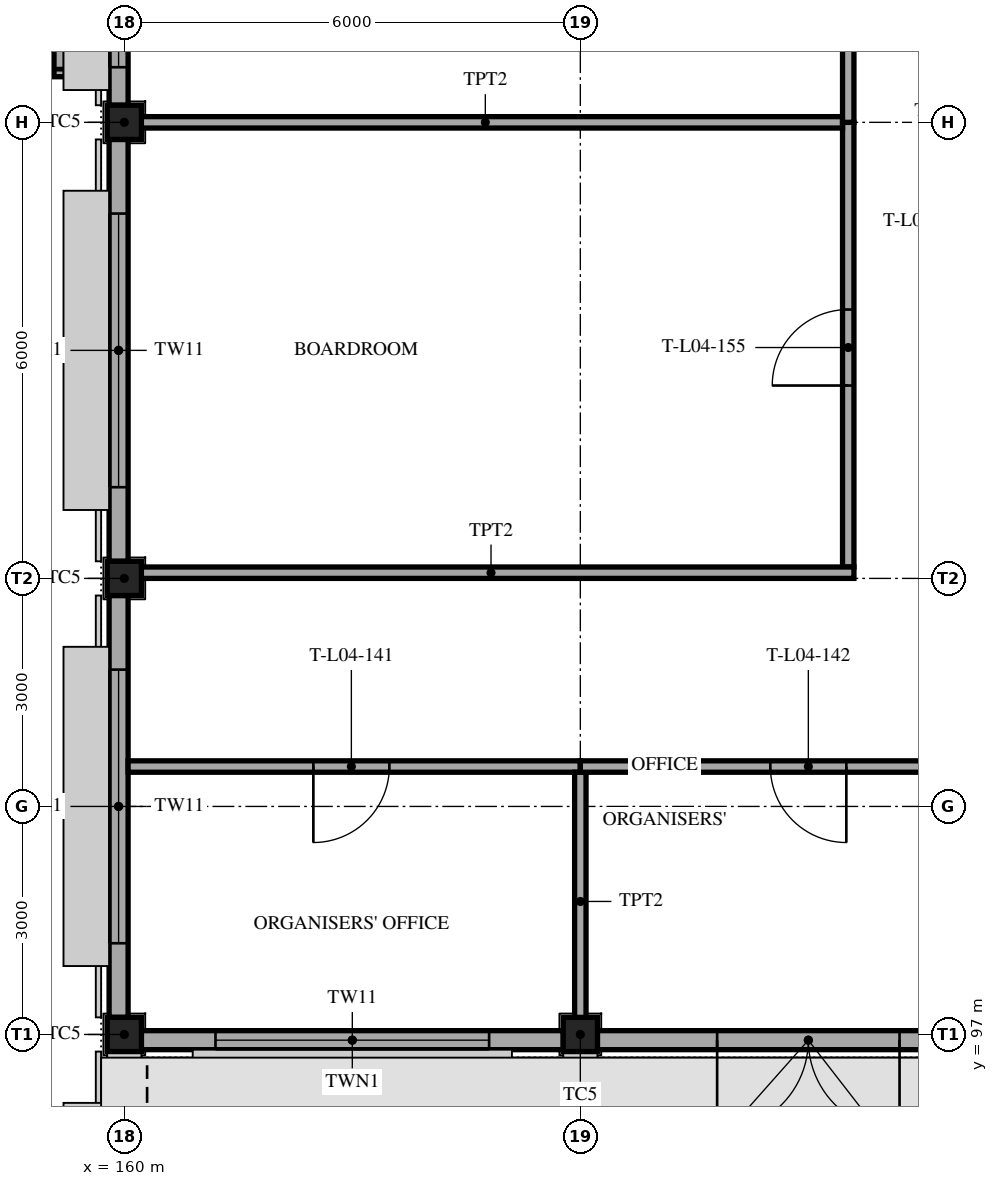
"""IFC4 building model, lengths in metres.
Left out: names, types, materials, properties, quantities, classifications, styles, units other than length and angle.
Written with IfcOpenShell. Run it as: python <this file> out.ifc"""

import sys

from ifc_helpers import new_model, si_unit, direction, frame, frame_2d, origin, origin_2d, place, context, subcontext, project, spatial, polyline, rectangle, hollow_rectangle, outline, extrude, element, fill, save


model = new_model("IFC4")
c1 = context("Model", 3, precision=1e-05, world=origin(), true_north=direction((0.0, 1.0)))
c2 = subcontext(c1, "Body", "Model", "MODEL_VIEW")
j1 = project(units=[si_unit("LENGTHUNIT", "METRE"), si_unit("PLANEANGLEUNIT", "RADIAN")], contexts=[c1])
p1 = place(None, origin())
s1 = spatial("IfcSite", under=j1, at=p1, CompositionType="ELEMENT")
p2 = place(p1, origin())
s2 = spatial("IfcBuilding", under=s1, at=p2, CompositionType="ELEMENT")
p3 = place(p2, frame((0.0, 0.0, 19.2)))
s3 = spatial("IfcBuildingStorey", under=s2, at=p3, CompositionType="ELEMENT", Elevation=19.2)
for number, where, z_axis, x_axis in (
    (1, (160.0, 97.0, 0.0), (0.0, 0.0, 1.0), (1.0, 0.0, 0.0)),
    (2, (160.0, 103.0, 0.0), (0.0, 0.0, 1.0), (1.0, 0.0, 0.0)),
    (3, (160.0, 109.0, 0.0), (0.0, 0.0, 1.0), (1.0, 0.0, 0.0)),
    (4, (166.0, 97.0, 0.0), (0.0, 0.0, 1.0), (1.0, 0.0, 0.0)),
):
    element("IfcColumn", number, at=place(p3, frame(where, z_axis=z_axis, x_axis=x_axis)), inside=s3, PredefinedType="COLUMN", context=c2, shape_type="SweptSolid", body=[
        extrude(hollow_rectangle(XDim=0.45, YDim=0.45, WallThickness=0.025, at=origin_2d()), origin(), (0.0, 0.0, 1.0), 4.2),
    ])
p4 = place(p3, frame((159.15, 109.6, 0.0), z_axis=(0.0, 0.0, 1.0), x_axis=(0.0, 1.0, 0.0)))
e5 = element("IfcWall", 5, at=p4, inside=s3, PredefinedType="STANDARD", context=c2, shape_type="SweptSolid", body=[
    extrude(outline(polyline([(0.0, 0.0), (23.0, 0.0), (22.97, 2.453), (22.83, 2.453), (22.829, 2.753), (19.171, 3.957), (19.17, 3.701), (19.03, 3.701), (19.029, 4.001), (15.371, 5.109), (15.37, 4.849), (15.23, 4.849), (15.229, 5.15), (11.571, 6.16), (11.57, 5.88), (11.43, 5.88), (11.429, 6.16), (7.771, 5.15), (7.77, 4.849), (7.63, 4.849), (7.629, 5.109), (3.971, 4.001), (3.97, 3.701), (3.83, 3.701), (3.829, 3.957), (0.171, 2.753), (0.17, 2.453), (0.03, 2.453), (0.0, 0.0)])), frame((0.0, 0.075, 0.0), z_axis=(0.0, -1.0, 0.0), x_axis=(1.0, 0.0, 0.0)), (0.0, 0.0, 1.0), 0.15),
])
p5 = place(p3, frame((160.225, 96.925, 0.0), z_axis=(0.0, 0.0, 1.0), x_axis=(1.0, 0.0, 0.0)))
e6 = element("IfcWall", 6, at=p5, inside=s3, PredefinedType="SOLIDWALL", context=c2, shape_type="SweptSolid", body=[
    extrude(rectangle(XDim=5.55, YDim=0.25, at=frame_2d((2.775, 0.0))), origin(), (0.0, 0.0, 1.0), 3.55),
])
p6 = place(p5, frame((0.975, 0.0, 0.9)))
e7 = element("IfcOpeningElement", 7, at=p6, cuts=e6, PredefinedType="OPENING", context=c2, shape_type="SweptSolid", body=[
    extrude(rectangle(XDim=3.6, YDim=2.4, at=frame_2d((1.8, 1.2))), frame((0.0, 0.135, 0.0), z_axis=(0.0, -1.0, 0.0), x_axis=(1.0, 0.0, 0.0)), (0.0, 0.0, 1.0), 0.27),
])
p7 = place(p3, frame((159.925, 91.225, 0.0), z_axis=(0.0, 0.0, 1.0), x_axis=(0.0, 1.0, 0.0)))
e8 = element("IfcWall", 8, at=p7, inside=s3, PredefinedType="SOLIDWALL", context=c2, shape_type="SweptSolid", body=[
    extrude(rectangle(XDim=5.55, YDim=0.25, at=frame_2d((2.775, 0.0))), origin(), (0.0, 0.0, 1.0), 3.55),
])
p8 = place(p7, frame((0.975, 0.0, 0.9)))
e9 = element("IfcOpeningElement", 9, at=p8, cuts=e8, PredefinedType="OPENING", context=c2, shape_type="SweptSolid", body=[
    extrude(rectangle(XDim=3.6, YDim=2.4, at=frame_2d((1.8, 1.2))), frame((0.0, 0.135, 0.0), z_axis=(0.0, -1.0, 0.0), x_axis=(1.0, 0.0, 0.0)), (0.0, 0.0, 1.0), 0.27),
])
p9 = place(p3, frame((159.925, 97.225, 0.0), z_axis=(0.0, 0.0, 1.0), x_axis=(0.0, 1.0, 0.0)))
e10 = element("IfcWall", 10, at=p9, inside=s3, PredefinedType="SOLIDWALL", context=c2, shape_type="SweptSolid", body=[
    extrude(rectangle(XDim=5.55, YDim=0.25, at=frame_2d((2.775, 0.0))), origin(), (0.0, 0.0, 1.0), 3.55),
])
p10 = place(p9, frame((0.975, 0.0, 0.9)))
e11 = element("IfcOpeningElement", 11, at=p10, cuts=e10, PredefinedType="OPENING", context=c2, shape_type="SweptSolid", body=[
    extrude(rectangle(XDim=3.6, YDim=2.4, at=frame_2d((1.8, 1.2))), frame((0.0, 0.135, 0.0), z_axis=(0.0, -1.0, 0.0), x_axis=(1.0, 0.0, 0.0)), (0.0, 0.0, 1.0), 0.27),
])
p11 = place(p3, frame((159.925, 103.225, 0.0), z_axis=(0.0, 0.0, 1.0), x_axis=(0.0, 1.0, 0.0)))
e12 = element("IfcWall", 12, at=p11, inside=s3, PredefinedType="SOLIDWALL", context=c2, shape_type="SweptSolid", body=[
    extrude(rectangle(XDim=5.55, YDim=0.25, at=frame_2d((2.775, 0.0))), origin(), (0.0, 0.0, 1.0), 3.55),
])
p12 = place(p11, frame((0.975, 0.0, 0.9)))
e13 = element("IfcOpeningElement", 13, at=p12, cuts=e12, PredefinedType="OPENING", context=c2, shape_type="SweptSolid", body=[
    extrude(rectangle(XDim=3.6, YDim=2.4, at=frame_2d((1.8, 1.2))), frame((0.0, 0.135, 0.0), z_axis=(0.0, -1.0, 0.0), x_axis=(1.0, 0.0, 0.0)), (0.0, 0.0, 1.0), 0.27),
])
p13 = place(p3, frame((159.925, 109.225, 0.0), z_axis=(0.0, 0.0, 1.0), x_axis=(0.0, 1.0, 0.0)))
e14 = element("IfcWall", 14, at=p13, inside=s3, PredefinedType="SOLIDWALL", context=c2, shape_type="SweptSolid", body=[
    extrude(rectangle(XDim=5.55, YDim=0.25, at=frame_2d((2.775, 0.0))), origin(), (0.0, 0.0, 1.0), 3.55),
])
p14 = place(p13, frame((0.5, 0.0, 1.85)))
e15 = element("IfcOpeningElement", 15, at=p14, cuts=e14, PredefinedType="OPENING", context=c2, shape_type="SweptSolid", body=[
    extrude(rectangle(XDim=1.6, YDim=1.6, at=frame_2d((0.8, 0.8))), frame((0.0, 0.135, 0.0), z_axis=(0.0, -1.0, 0.0), x_axis=(1.0, 0.0, 0.0)), (0.0, 0.0, 1.0), 0.27),
])
p15 = place(p3, frame((166.225, 96.925, 0.0), z_axis=(0.0, 0.0, 1.0), x_axis=(1.0, 0.0, 0.0)))
e16 = element("IfcWall", 16, at=p15, inside=s3, PredefinedType="SOLIDWALL", context=c2, shape_type="SweptSolid", body=[
    extrude(rectangle(XDim=5.55, YDim=0.25, at=frame_2d((2.775, 0.0))), origin(), (0.0, 0.0, 1.0), 3.55),
])
p16 = place(p15, frame((1.575, 0.0, 0.0)))
e17 = element("IfcOpeningElement", 17, at=p16, cuts=e16, PredefinedType="OPENING", context=c2, shape_type="SweptSolid", body=[
    extrude(rectangle(XDim=2.4, YDim=2.1, at=frame_2d((1.2, 1.05))), frame((0.0, 0.135, 0.0), z_axis=(0.0, -1.0, 0.0), x_axis=(1.0, 0.0, 0.0)), (0.0, 0.0, 1.0), 0.27),
])
p17 = place(p3, frame((160.05, 100.525, 0.0), z_axis=(0.0, 0.0, 1.0), x_axis=(1.0, 0.0, 0.0)))
e18 = element("IfcWall", 18, at=p17, inside=s3, PredefinedType="PARTITIONING", context=c2, shape_type="SweptSolid", body=[
    extrude(rectangle(XDim=5.95, YDim=0.15, at=frame_2d((2.975, 0.0))), origin(), (0.0, 0.0, 1.0), 3.45),
])
p18 = place(p17, frame((2.438, 0.0, 0.0)))
e19 = element("IfcOpeningElement", 19, at=p18, cuts=e18, PredefinedType="OPENING", context=c2, shape_type="SweptSolid", body=[
    extrude(rectangle(XDim=1.0, YDim=2.1, at=frame_2d((0.5, 1.05))), frame((0.0, 0.085, 0.0), z_axis=(0.0, -1.0, 0.0), x_axis=(1.0, 0.0, 0.0)), (0.0, 0.0, 1.0), 0.17),
])
p19 = place(p3, frame((166.0, 97.05, 0.0), z_axis=(0.0, 0.0, 1.0), x_axis=(0.0, 1.0, 0.0)))
e20 = element("IfcWall", 20, at=p19, inside=s3, PredefinedType="PARTITIONING", context=c2, shape_type="SweptSolid", body=[
    extrude(rectangle(XDim=3.4, YDim=0.15, at=frame_2d((1.7, 0.0))), origin(), (0.0, 0.0, 1.0), 3.45),
])
p20 = place(p3, frame((166.0, 100.525, 0.0), z_axis=(0.0, 0.0, 1.0), x_axis=(1.0, 0.0, 0.0)))
e21 = element("IfcWall", 21, at=p20, inside=s3, PredefinedType="PARTITIONING", context=c2, shape_type="SweptSolid", body=[
    extrude(rectangle(XDim=6.0, YDim=0.15, at=frame_2d((3.0, 0.0))), origin(), (0.0, 0.0, 1.0), 3.45),
])
p21 = place(p20, frame((2.5, 0.0, 0.0)))
e22 = element("IfcOpeningElement", 22, at=p21, cuts=e21, PredefinedType="OPENING", context=c2, shape_type="SweptSolid", body=[
    extrude(rectangle(XDim=1.0, YDim=2.1, at=frame_2d((0.5, 1.05))), frame((0.0, 0.085, 0.0), z_axis=(0.0, -1.0, 0.0), x_axis=(1.0, 0.0, 0.0)), (0.0, 0.0, 1.0), 0.17),
])
p22 = place(p3, frame((169.525, 103.15, 0.0), z_axis=(0.0, 0.0, 1.0), x_axis=(0.0, 1.0, 0.0)))
e23 = element("IfcWall", 23, at=p22, inside=s3, PredefinedType="PARTITIONING", context=c2, shape_type="SweptSolid", body=[
    extrude(rectangle(XDim=5.85, YDim=0.15, at=frame_2d((2.925, 0.0))), origin(), (0.0, 0.0, 1.0), 3.45),
])
p23 = place(p22, frame((2.387, 0.0, 0.0)))
e24 = element("IfcOpeningElement", 24, at=p23, cuts=e23, PredefinedType="OPENING", context=c2, shape_type="SweptSolid", body=[
    extrude(rectangle(XDim=1.0, YDim=2.1, at=frame_2d((0.5, 1.05))), frame((0.0, 0.085, 0.0), z_axis=(0.0, -1.0, 0.0), x_axis=(1.0, 0.0, 0.0)), (0.0, 0.0, 1.0), 0.17),
])
p24 = place(p3, frame((160.05, 109.0, 0.0), z_axis=(0.0, 0.0, 1.0), x_axis=(1.0, 0.0, 0.0)))
e25 = element("IfcWall", 25, at=p24, inside=s3, PredefinedType="PARTITIONING", context=c2, shape_type="SweptSolid", body=[
    extrude(rectangle(XDim=9.4, YDim=0.15, at=frame_2d((4.7, 0.0))), origin(), (0.0, 0.0, 1.0), 3.45),
])
p25 = place(p3, frame((169.525, 109.0, 0.0), z_axis=(0.0, 0.0, 1.0), x_axis=(0.0, 1.0, 0.0)))
e26 = element("IfcWall", 26, at=p25, inside=s3, PredefinedType="PARTITIONING", context=c2, shape_type="SweptSolid", body=[
    extrude(rectangle(XDim=11.85, YDim=0.15, at=frame_2d((5.925, 0.0))), origin(), (0.0, 0.0, 1.0), 3.45),
])
p26 = place(p25, frame((5.262, 0.0, 0.0)))
e27 = element("IfcOpeningElement", 27, at=p26, cuts=e26, PredefinedType="OPENING", context=c2, shape_type="SweptSolid", body=[
    extrude(rectangle(XDim=1.4, YDim=2.1, at=frame_2d((0.7, 1.05))), frame((0.0, 0.085, 0.0), z_axis=(0.0, -1.0, 0.0), x_axis=(1.0, 0.0, 0.0)), (0.0, 0.0, 1.0), 0.17),
])
p27 = place(p3, frame((160.05, 103.075, 0.0), z_axis=(0.0, 0.0, 1.0), x_axis=(1.0, 0.0, 0.0)))
e28 = element("IfcWall", 28, at=p27, inside=s3, PredefinedType="PARTITIONING", context=c2, shape_type="SweptSolid", body=[
    extrude(rectangle(XDim=9.55, YDim=0.15, at=frame_2d((4.775, 0.0))), origin(), (0.0, 0.0, 1.0), 3.45),
])
p28 = place(p6, origin())
e29 = element("IfcWindow", 29, at=p28, inside=s3, PartitioningType="TRIPLE_PANEL_VERTICAL", PredefinedType="WINDOW", context=c2, shape_type="SweptSolid", body=[
    extrude(outline(polyline([(0.0, 0.0), (3.6, 0.0), (3.6, 2.4), (0.0, 2.4), (0.0, 0.0)]), holes=[polyline([(0.06, 0.06), (0.96, 0.06), (0.96, 2.34), (0.06, 2.34), (0.06, 0.06)]), polyline([(1.06, 0.06), (2.54, 0.06), (2.54, 2.34), (1.06, 2.34), (1.06, 0.06)]), polyline([(2.64, 0.06), (3.54, 0.06), (3.54, 2.34), (2.64, 2.34), (2.64, 0.06)])]), frame((0.0, 0.03, 0.0), z_axis=(0.0, -1.0, 0.0), x_axis=(1.0, 0.0, 0.0)), (0.0, 0.0, 1.0), 0.06),
    extrude(rectangle(XDim=0.924, YDim=2.304, at=frame_2d((0.51, 1.2))), frame((0.0, 0.01, 0.0), z_axis=(0.0, -1.0, 0.0), x_axis=(1.0, 0.0, 0.0)), (0.0, 0.0, 1.0), 0.02),
    extrude(rectangle(XDim=1.504, YDim=2.304, at=frame_2d((1.8, 1.2))), frame((0.0, 0.01, 0.0), z_axis=(0.0, -1.0, 0.0), x_axis=(1.0, 0.0, 0.0)), (0.0, 0.0, 1.0), 0.02),
    extrude(rectangle(XDim=0.924, YDim=2.304, at=frame_2d((3.09, 1.2))), frame((0.0, 0.01, 0.0), z_axis=(0.0, -1.0, 0.0), x_axis=(1.0, 0.0, 0.0)), (0.0, 0.0, 1.0), 0.02),
])
fill(e7, e29)
p29 = place(p10, origin())
e30 = element("IfcWindow", 30, at=p29, inside=s3, PartitioningType="TRIPLE_PANEL_VERTICAL", PredefinedType="WINDOW", context=c2, shape_type="SweptSolid", body=[
    extrude(outline(polyline([(0.0, 0.0), (3.6, 0.0), (3.6, 2.4), (0.0, 2.4), (0.0, 0.0)]), holes=[polyline([(0.06, 0.06), (0.96, 0.06), (0.96, 2.34), (0.06, 2.34), (0.06, 0.06)]), polyline([(1.06, 0.06), (2.54, 0.06), (2.54, 2.34), (1.06, 2.34), (1.06, 0.06)]), polyline([(2.64, 0.06), (3.54, 0.06), (3.54, 2.34), (2.64, 2.34), (2.64, 0.06)])]), frame((0.0, 0.03, 0.0), z_axis=(0.0, -1.0, 0.0), x_axis=(1.0, 0.0, 0.0)), (0.0, 0.0, 1.0), 0.06),
    extrude(rectangle(XDim=0.924, YDim=2.304, at=frame_2d((0.51, 1.2))), frame((0.0, 0.01, 0.0), z_axis=(0.0, -1.0, 0.0), x_axis=(1.0, 0.0, 0.0)), (0.0, 0.0, 1.0), 0.02),
    extrude(rectangle(XDim=1.504, YDim=2.304, at=frame_2d((1.8, 1.2))), frame((0.0, 0.01, 0.0), z_axis=(0.0, -1.0, 0.0), x_axis=(1.0, 0.0, 0.0)), (0.0, 0.0, 1.0), 0.02),
    extrude(rectangle(XDim=0.924, YDim=2.304, at=frame_2d((3.09, 1.2))), frame((0.0, 0.01, 0.0), z_axis=(0.0, -1.0, 0.0), x_axis=(1.0, 0.0, 0.0)), (0.0, 0.0, 1.0), 0.02),
])
fill(e11, e30)
p30 = place(p12, origin())
e31 = element("IfcWindow", 31, at=p30, inside=s3, PartitioningType="TRIPLE_PANEL_VERTICAL", PredefinedType="WINDOW", context=c2, shape_type="SweptSolid", body=[
    extrude(outline(polyline([(0.0, 0.0), (3.6, 0.0), (3.6, 2.4), (0.0, 2.4), (0.0, 0.0)]), holes=[polyline([(0.06, 0.06), (0.96, 0.06), (0.96, 2.34), (0.06, 2.34), (0.06, 0.06)]), polyline([(1.06, 0.06), (2.54, 0.06), (2.54, 2.34), (1.06, 2.34), (1.06, 0.06)]), polyline([(2.64, 0.06), (3.54, 0.06), (3.54, 2.34), (2.64, 2.34), (2.64, 0.06)])]), frame((0.0, 0.03, 0.0), z_axis=(0.0, -1.0, 0.0), x_axis=(1.0, 0.0, 0.0)), (0.0, 0.0, 1.0), 0.06),
    extrude(rectangle(XDim=0.924, YDim=2.304, at=frame_2d((0.51, 1.2))), frame((0.0, 0.01, 0.0), z_axis=(0.0, -1.0, 0.0), x_axis=(1.0, 0.0, 0.0)), (0.0, 0.0, 1.0), 0.02),
    extrude(rectangle(XDim=1.504, YDim=2.304, at=frame_2d((1.8, 1.2))), frame((0.0, 0.01, 0.0), z_axis=(0.0, -1.0, 0.0), x_axis=(1.0, 0.0, 0.0)), (0.0, 0.0, 1.0), 0.02),
    extrude(rectangle(XDim=0.924, YDim=2.304, at=frame_2d((3.09, 1.2))), frame((0.0, 0.01, 0.0), z_axis=(0.0, -1.0, 0.0), x_axis=(1.0, 0.0, 0.0)), (0.0, 0.0, 1.0), 0.02),
])
fill(e13, e31)
p31 = place(p14, origin())
e32 = element("IfcWindow", 32, at=p31, inside=s3, PartitioningType="TRIPLE_PANEL_VERTICAL", PredefinedType="WINDOW", context=c2, shape_type="SweptSolid", body=[
    extrude(outline(polyline([(0.0, 0.0), (1.6, 0.0), (1.6, 1.6), (0.0, 1.6), (0.0, 0.0)]), holes=[polyline([(0.06, 0.06), (0.56, 0.06), (0.56, 1.54), (0.06, 1.54), (0.06, 0.06)]), polyline([(0.66, 0.06), (0.94, 0.06), (0.94, 1.54), (0.66, 1.54), (0.66, 0.06)]), polyline([(1.04, 0.06), (1.54, 0.06), (1.54, 1.54), (1.04, 1.54), (1.04, 0.06)])]), frame((0.0, 0.03, 0.0), z_axis=(0.0, -1.0, 0.0), x_axis=(1.0, 0.0, 0.0)), (0.0, 0.0, 1.0), 0.06),
    extrude(rectangle(XDim=0.524, YDim=1.504, at=frame_2d((0.31, 0.8))), frame((0.0, 0.01, 0.0), z_axis=(0.0, -1.0, 0.0), x_axis=(1.0, 0.0, 0.0)), (0.0, 0.0, 1.0), 0.02),
    extrude(rectangle(XDim=0.304, YDim=1.504, at=frame_2d((0.8, 0.8))), frame((0.0, 0.01, 0.0), z_axis=(0.0, -1.0, 0.0), x_axis=(1.0, 0.0, 0.0)), (0.0, 0.0, 1.0), 0.02),
    extrude(rectangle(XDim=0.524, YDim=1.504, at=frame_2d((1.29, 0.8))), frame((0.0, 0.01, 0.0), z_axis=(0.0, -1.0, 0.0), x_axis=(1.0, 0.0, 0.0)), (0.0, 0.0, 1.0), 0.02),
])
fill(e15, e32)
p32 = place(p16, frame((2.4, 0.0, 0.0), z_axis=(0.0, 0.0, 1.0), x_axis=(-1.0, 0.0, 0.0)))
e33 = element("IfcDoor", 33, at=p32, inside=s3, OperationType="DOUBLE_DOOR_SINGLE_SWING", PredefinedType="DOOR", context=c2, shape_type="SweptSolid", body=[
    extrude(rectangle(XDim=2.4, YDim=2.1, at=frame_2d((1.2, 1.05))), frame((0.0, 0.025, 0.0), z_axis=(0.0, -1.0, 0.0), x_axis=(1.0, 0.0, 0.0)), (0.0, 0.0, 1.0), 0.05),
])
fill(e17, e33)
p33 = place(p18, frame((1.0, 0.0, 0.0), z_axis=(0.0, 0.0, 1.0), x_axis=(-1.0, 0.0, 0.0)))
e34 = element("IfcDoor", 34, at=p33, inside=s3, OperationType="SINGLE_SWING_RIGHT", PredefinedType="DOOR", context=c2, shape_type="SweptSolid", body=[
    extrude(rectangle(XDim=1.0, YDim=2.1, at=frame_2d((0.5, 1.05))), frame((0.0, 0.025, 0.0), z_axis=(0.0, -1.0, 0.0), x_axis=(1.0, 0.0, 0.0)), (0.0, 0.0, 1.0), 0.05),
])
fill(e19, e34)
p34 = place(p21, frame((1.0, 0.0, 0.0), z_axis=(0.0, 0.0, 1.0), x_axis=(-1.0, 0.0, 0.0)))
e35 = element("IfcDoor", 35, at=p34, inside=s3, OperationType="SINGLE_SWING_LEFT", PredefinedType="DOOR", context=c2, shape_type="SweptSolid", body=[
    extrude(rectangle(XDim=1.0, YDim=2.1, at=frame_2d((0.5, 1.05))), frame((0.0, 0.025, 0.0), z_axis=(0.0, -1.0, 0.0), x_axis=(1.0, 0.0, 0.0)), (0.0, 0.0, 1.0), 0.05),
])
fill(e22, e35)
p35 = place(p23, origin())
e36 = element("IfcDoor", 36, at=p35, inside=s3, OperationType="SINGLE_SWING_LEFT", PredefinedType="DOOR", context=c2, shape_type="SweptSolid", body=[
    extrude(rectangle(XDim=1.0, YDim=2.1, at=frame_2d((0.5, 1.05))), frame((0.0, 0.025, 0.0), z_axis=(0.0, -1.0, 0.0), x_axis=(1.0, 0.0, 0.0)), (0.0, 0.0, 1.0), 0.05),
])
fill(e24, e36)
save(model, sys.argv[1])
